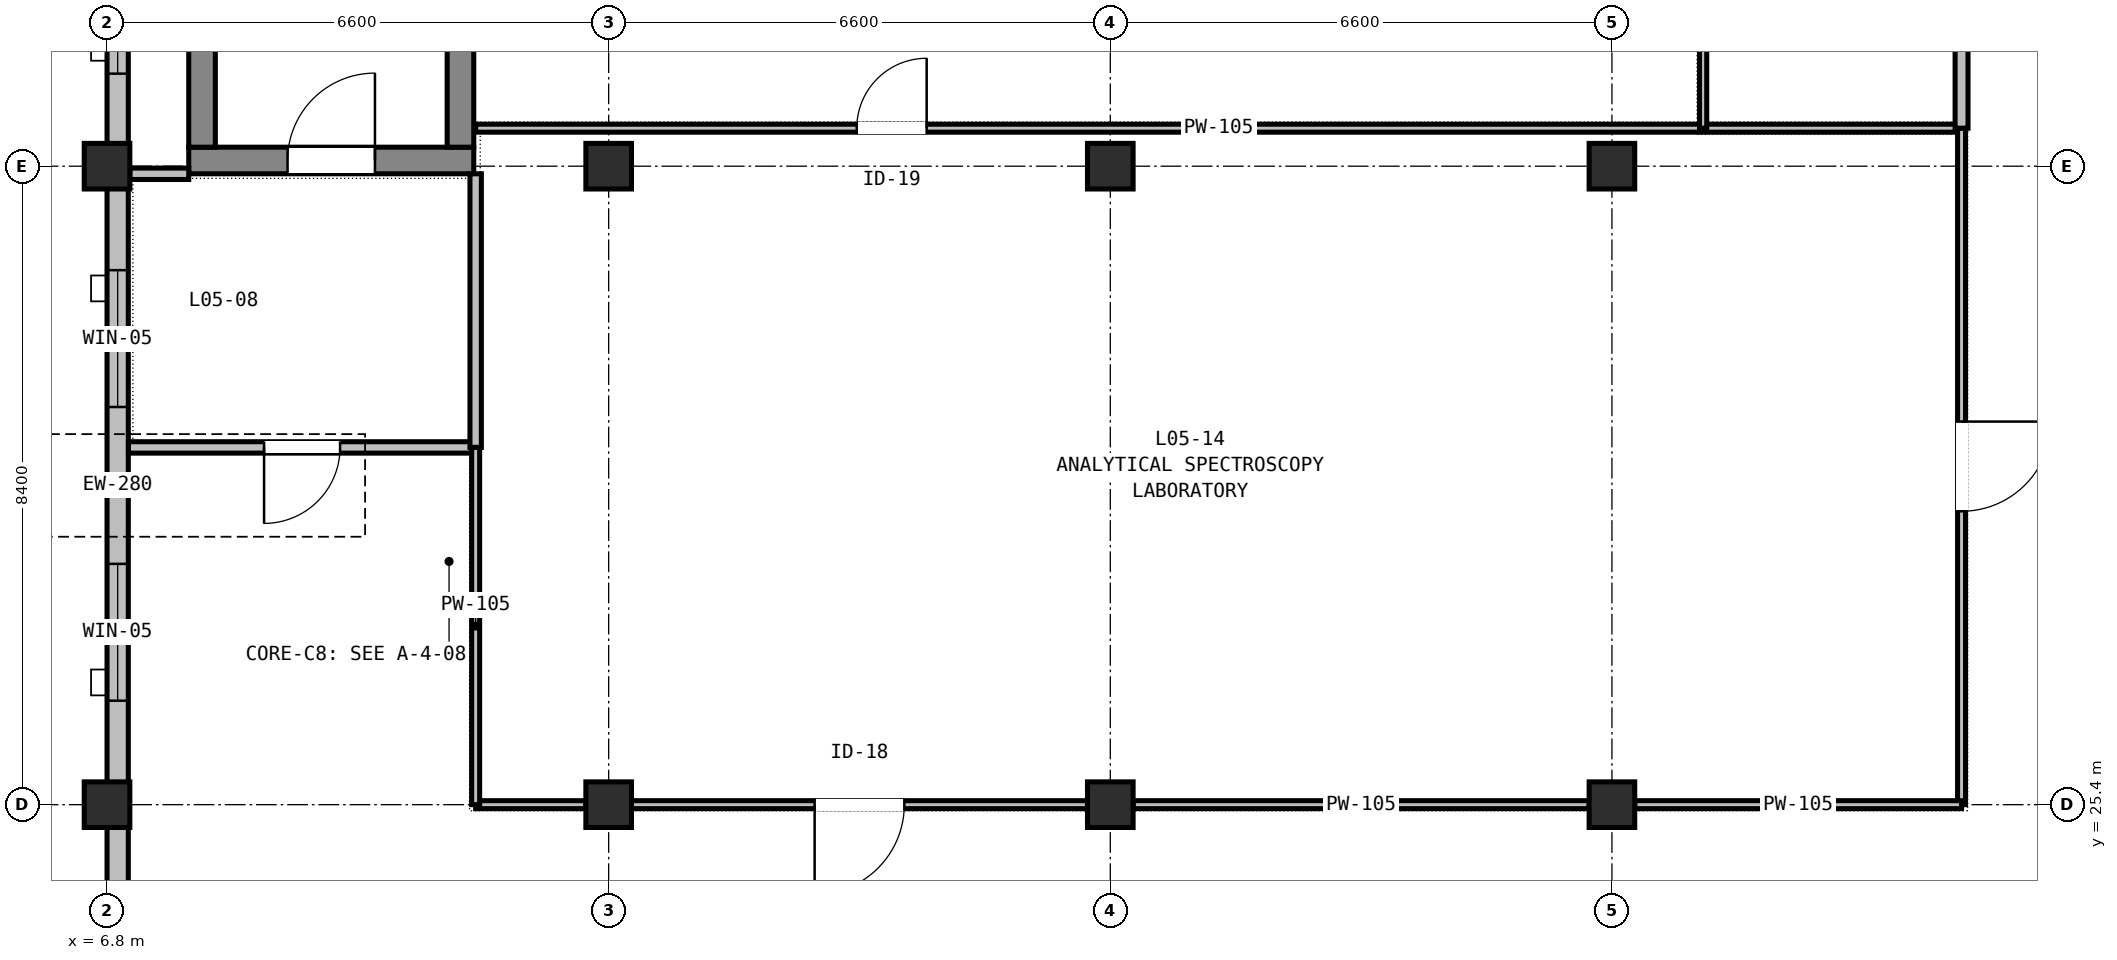
"""IFC4 building model, lengths in metres.
Left out: names, types, materials, properties, quantities, classifications, styles, units other than length and angle.
Written with IfcOpenShell. Run it as: python <this file> out.ifc"""

import sys

from ifc_helpers import new_model, si_unit, direction, frame, frame_2d, origin, origin_2d, place, context, subcontext, project, spatial, rectangle, extrude, element, fill, save


model = new_model("IFC4")
c1 = context("Model", 3, precision=1e-05, world=origin(), true_north=direction((0.0, 1.0)))
c2 = subcontext(c1, "Body", "Model", "MODEL_VIEW")
j1 = project(units=[si_unit("LENGTHUNIT", "METRE"), si_unit("PLANEANGLEUNIT", "RADIAN")], contexts=[c1])
p1 = place(None, origin())
s1 = spatial("IfcSite", under=j1, at=p1, CompositionType="ELEMENT")
p2 = place(p1, origin())
s2 = spatial("IfcBuilding", under=s1, at=p2, CompositionType="ELEMENT")
p3 = place(p2, frame((0.0, 0.0, 24.0)))
s3 = spatial("IfcBuildingStorey", under=s2, at=p3, CompositionType="ELEMENT", Elevation=24.0)
for number, where, z_axis, x_axis in (
    (1, (6.8, 25.4, 0.0), (0.0, 0.0, 1.0), (1.0, 0.0, 0.0)),
    (2, (6.8, 33.8, 0.0), (0.0, 0.0, 1.0), (1.0, 0.0, 0.0)),
    (3, (13.4, 25.4, 0.0), (0.0, 0.0, 1.0), (1.0, 0.0, 0.0)),
    (4, (13.4, 33.8, 0.0), (0.0, 0.0, 1.0), (1.0, 0.0, 0.0)),
    (5, (20.0, 25.4, 0.0), (0.0, 0.0, 1.0), (1.0, 0.0, 0.0)),
    (6, (20.0, 33.8, 0.0), (0.0, 0.0, 1.0), (1.0, 0.0, 0.0)),
    (7, (26.6, 25.4, 0.0), (0.0, 0.0, 1.0), (1.0, 0.0, 0.0)),
    (8, (26.6, 33.8, 0.0), (0.0, 0.0, 1.0), (1.0, 0.0, 0.0)),
):
    element("IfcColumn", number, at=place(p3, frame(where, z_axis=z_axis, x_axis=x_axis)), inside=s3, PredefinedType="COLUMN", context=c2, shape_type="SweptSolid", body=[
        extrude(rectangle(XDim=0.6, YDim=0.6, at=origin_2d()), origin(), (0.0, 0.0, 1.0), 4.44),
    ])
p4 = place(p3, frame((7.875, 33.875, 0.0), z_axis=(0.0, 0.0, 1.0), x_axis=(1.0, 0.0, 0.0)))
e9 = element("IfcWall", 9, at=p4, inside=s3, PredefinedType="SHEAR", context=c2, shape_type="SweptSolid", body=[
    extrude(rectangle(XDim=3.75, YDim=0.35, at=frame_2d((1.875, 0.0))), origin(), (0.0, 0.0, 1.0), 4.44),
])
p5 = place(p4, frame((1.3, 0.0, 0.0)))
e10 = element("IfcOpeningElement", 10, at=p5, cuts=e9, PredefinedType="OPENING", context=c2, shape_type="SweptSolid", body=[
    extrude(rectangle(XDim=1.15, YDim=2.15, at=frame_2d((0.575, 1.075))), frame((0.0, 0.185, 0.0), z_axis=(0.0, -1.0, 0.0), x_axis=(1.0, 0.0, 0.0)), (0.0, 0.0, 1.0), 0.37),
])
for number, where, z_axis, x_axis in (
    (11, (8.05, 34.05, 0.0), (0.0, 0.0, 1.0), (0.0, 1.0, 0.0)),
    (12, (11.45, 34.05, 0.0), (0.0, 0.0, 1.0), (0.0, 1.0, 0.0)),
):
    element("IfcWall", number, at=place(p3, frame(where, z_axis=z_axis, x_axis=x_axis)), inside=s3, PredefinedType="SHEAR", context=c2, shape_type="SweptSolid", body=[
        extrude(rectangle(XDim=7.275, YDim=0.35, at=frame_2d((3.637, 0.0))), origin(), (0.0, 0.0, 1.0), 4.44),
    ])
p6 = place(p3, frame((6.94, 17.28, 0.0), z_axis=(0.0, 0.0, 1.0), x_axis=(0.0, 1.0, 0.0)))
e13 = element("IfcWall", 13, at=p6, inside=s3, PredefinedType="STANDARD", context=c2, shape_type="SweptSolid", body=[
    extrude(rectangle(XDim=8.12, YDim=0.28, at=frame_2d((4.06, 0.0))), origin(), (0.0, 0.0, 1.0), 3.885),
])
p7 = place(p6, frame((1.367, 0.0, 0.9)))
e14 = element("IfcOpeningElement", 14, at=p7, cuts=e13, PredefinedType="OPENING", context=c2, shape_type="SweptSolid", body=[
    extrude(rectangle(XDim=1.65, YDim=2.1, at=frame_2d((0.825, 1.05))), frame((0.0, 0.15, 0.0), z_axis=(0.0, -1.0, 0.0), x_axis=(1.0, 0.0, 0.0)), (0.0, 0.0, 1.0), 0.3),
])
p8 = place(p6, frame((3.83, 0.0, 0.9)))
e15 = element("IfcOpeningElement", 15, at=p8, cuts=e13, PredefinedType="OPENING", context=c2, shape_type="SweptSolid", body=[
    extrude(rectangle(XDim=1.65, YDim=2.1, at=frame_2d((0.825, 1.05))), frame((0.0, 0.15, 0.0), z_axis=(0.0, -1.0, 0.0), x_axis=(1.0, 0.0, 0.0)), (0.0, 0.0, 1.0), 0.3),
])
p9 = place(p3, frame((6.94, 25.4, 0.0), z_axis=(0.0, 0.0, 1.0), x_axis=(0.0, 1.0, 0.0)))
e16 = element("IfcWall", 16, at=p9, inside=s3, PredefinedType="STANDARD", context=c2, shape_type="SweptSolid", body=[
    extrude(rectangle(XDim=8.4, YDim=0.28, at=frame_2d((4.2, 0.0))), origin(), (0.0, 0.0, 1.0), 3.885),
])
p10 = place(p9, frame((1.368, 0.0, 0.9)))
e17 = element("IfcOpeningElement", 17, at=p10, cuts=e16, PredefinedType="OPENING", context=c2, shape_type="SweptSolid", body=[
    extrude(rectangle(XDim=1.8, YDim=2.1, at=frame_2d((0.9, 1.05))), frame((0.0, 0.15, 0.0), z_axis=(0.0, -1.0, 0.0), x_axis=(1.0, 0.0, 0.0)), (0.0, 0.0, 1.0), 0.3),
])
p11 = place(p9, frame((5.232, 0.0, 0.9)))
e18 = element("IfcOpeningElement", 18, at=p11, cuts=e16, PredefinedType="OPENING", context=c2, shape_type="SweptSolid", body=[
    extrude(rectangle(XDim=1.8, YDim=2.1, at=frame_2d((0.9, 1.05))), frame((0.0, 0.15, 0.0), z_axis=(0.0, -1.0, 0.0), x_axis=(1.0, 0.0, 0.0)), (0.0, 0.0, 1.0), 0.3),
])
p12 = place(p3, frame((6.94, 33.8, 0.0), z_axis=(0.0, 0.0, 1.0), x_axis=(0.0, 1.0, 0.0)))
e19 = element("IfcWall", 19, at=p12, inside=s3, PredefinedType="STANDARD", context=c2, shape_type="SweptSolid", body=[
    extrude(rectangle(XDim=8.12, YDim=0.28, at=frame_2d((4.06, 0.0))), origin(), (0.0, 0.0, 1.0), 3.885),
])
p13 = place(p12, frame((1.217, 0.0, 0.9)))
e20 = element("IfcOpeningElement", 20, at=p13, cuts=e19, PredefinedType="OPENING", context=c2, shape_type="SweptSolid", body=[
    extrude(rectangle(XDim=1.95, YDim=2.1, at=frame_2d((0.975, 1.05))), frame((0.0, 0.15, 0.0), z_axis=(0.0, -1.0, 0.0), x_axis=(1.0, 0.0, 0.0)), (0.0, 0.0, 1.0), 0.3),
])
p14 = place(p12, frame((4.953, 0.0, 0.9)))
e21 = element("IfcOpeningElement", 21, at=p14, cuts=e19, PredefinedType="OPENING", context=c2, shape_type="SweptSolid", body=[
    extrude(rectangle(XDim=1.95, YDim=2.1, at=frame_2d((0.975, 1.05))), frame((0.0, 0.15, 0.0), z_axis=(0.0, -1.0, 0.0), x_axis=(1.0, 0.0, 0.0)), (0.0, 0.0, 1.0), 0.3),
])
p15 = place(p3, frame((11.65, 30.1, 0.0), z_axis=(0.0, 0.0, 1.0), x_axis=(-1.0, 0.0, 0.0)))
e22 = element("IfcWall", 22, at=p15, inside=s3, PredefinedType="PARTITIONING", context=c2, shape_type="SweptSolid", body=[
    extrude(rectangle(XDim=4.568, YDim=0.15, at=frame_2d((2.284, 0.0))), origin(), (0.0, 0.0, 1.0), 3.985),
])
p16 = place(p15, frame((1.784, 0.0, 0.0)))
e23 = element("IfcOpeningElement", 23, at=p16, cuts=e22, PredefinedType="OPENING", context=c2, shape_type="SweptSolid", body=[
    extrude(rectangle(XDim=1.0, YDim=2.1, at=frame_2d((0.5, 1.05))), frame((0.0, 0.085, 0.0), z_axis=(0.0, -1.0, 0.0), x_axis=(1.0, 0.0, 0.0)), (0.0, 0.0, 1.0), 0.17),
])
p17 = place(p3, frame((7.1, 33.7, 0.0), z_axis=(0.0, 0.0, 1.0), x_axis=(1.0, 0.0, 0.0)))
e24 = element("IfcWall", 24, at=p17, inside=s3, PredefinedType="PARTITIONING", context=c2, shape_type="SweptSolid", body=[
    extrude(rectangle(XDim=0.775, YDim=0.15, at=frame_2d((0.387, 0.0))), origin(), (0.0, 0.0, 1.0), 3.885),
])
p18 = place(p3, frame((11.65, 33.7, 0.0), z_axis=(0.0, 0.0, 1.0), x_axis=(0.0, -1.0, 0.0)))
e25 = element("IfcWall", 25, at=p18, inside=s3, PredefinedType="PARTITIONING", context=c2, shape_type="SweptSolid", body=[
    extrude(rectangle(XDim=3.6, YDim=0.15, at=frame_2d((1.8, 0.0))), origin(), (0.0, 0.0, 1.0), 3.885),
])
p19 = place(p3, frame((11.65, 34.3, 0.0), z_axis=(0.0, 0.0, 1.0), x_axis=(1.0, 0.0, 0.0)))
e26 = element("IfcWall", 26, at=p19, inside=s3, PredefinedType="PARTITIONING", context=c2, shape_type="SweptSolid", body=[
    extrude(rectangle(XDim=19.55, YDim=0.105, at=frame_2d((9.775, 0.0))), origin(), (0.0, 0.0, 1.0), 3.735),
])
p20 = place(p19, frame((5.014, 0.0, 0.0)))
e27 = element("IfcOpeningElement", 27, at=p20, cuts=e26, PredefinedType="OPENING", context=c2, shape_type="SweptSolid", body=[
    extrude(rectangle(XDim=0.92, YDim=2.14, at=frame_2d((0.46, 1.07))), frame((0.0, 0.062, 0.0), z_axis=(0.0, -1.0, 0.0), x_axis=(1.0, 0.0, 0.0)), (0.0, 0.0, 1.0), 0.125),
])
p21 = place(p3, frame((31.2, 34.3, 0.0), z_axis=(0.0, 0.0, 1.0), x_axis=(0.0, -1.0, 0.0)))
e28 = element("IfcWall", 28, at=p21, inside=s3, PredefinedType="PARTITIONING", context=c2, shape_type="SweptSolid", body=[
    extrude(rectangle(XDim=8.9, YDim=0.105, at=frame_2d((4.45, 0.0))), origin(), (0.0, 0.0, 1.0), 3.885),
])
p22 = place(p21, frame((3.86, 0.0, 0.0)))
e29 = element("IfcOpeningElement", 29, at=p22, cuts=e28, PredefinedType="OPENING", context=c2, shape_type="SweptSolid", body=[
    extrude(rectangle(XDim=1.18, YDim=2.1, at=frame_2d((0.59, 1.05))), frame((0.0, 0.062, 0.0), z_axis=(0.0, -1.0, 0.0), x_axis=(1.0, 0.0, 0.0)), (0.0, 0.0, 1.0), 0.125),
])
p23 = place(p3, frame((31.2, 25.4, 0.0), z_axis=(0.0, 0.0, 1.0), x_axis=(-1.0, 0.0, 0.0)))
e30 = element("IfcWall", 30, at=p23, inside=s3, PredefinedType="PARTITIONING", context=c2, shape_type="SweptSolid", body=[
    extrude(rectangle(XDim=4.3, YDim=0.105, at=frame_2d((2.15, 0.0))), origin(), (0.0, 0.0, 1.0), 3.885),
])
p24 = place(p3, frame((26.3, 25.4, 0.0), z_axis=(0.0, 0.0, 1.0), x_axis=(-1.0, 0.0, 0.0)))
e31 = element("IfcWall", 31, at=p24, inside=s3, PredefinedType="PARTITIONING", context=c2, shape_type="SweptSolid", body=[
    extrude(rectangle(XDim=6.0, YDim=0.105, at=frame_2d((3.0, 0.0))), origin(), (0.0, 0.0, 1.0), 3.885),
])
p25 = place(p3, frame((19.7, 25.4, 0.0), z_axis=(0.0, 0.0, 1.0), x_axis=(-1.0, 0.0, 0.0)))
e32 = element("IfcWall", 32, at=p25, inside=s3, PredefinedType="PARTITIONING", context=c2, shape_type="SweptSolid", body=[
    extrude(rectangle(XDim=6.0, YDim=0.105, at=frame_2d((3.0, 0.0))), origin(), (0.0, 0.0, 1.0), 3.885),
])
p26 = place(p25, frame((2.41, 0.0, 0.0)))
e33 = element("IfcOpeningElement", 33, at=p26, cuts=e32, PredefinedType="OPENING", context=c2, shape_type="SweptSolid", body=[
    extrude(rectangle(XDim=1.18, YDim=2.1, at=frame_2d((0.59, 1.05))), frame((0.0, 0.062, 0.0), z_axis=(0.0, -1.0, 0.0), x_axis=(1.0, 0.0, 0.0)), (0.0, 0.0, 1.0), 0.125),
])
p27 = place(p3, frame((13.1, 25.4, 0.0), z_axis=(0.0, 0.0, 1.0), x_axis=(-1.0, 0.0, 0.0)))
e34 = element("IfcWall", 34, at=p27, inside=s3, PredefinedType="PARTITIONING", context=c2, shape_type="SweptSolid", body=[
    extrude(rectangle(XDim=1.45, YDim=0.105, at=frame_2d((0.725, 0.0))), origin(), (0.0, 0.0, 1.0), 3.885),
])
p28 = place(p3, frame((11.65, 25.4, 0.0), z_axis=(0.0, 0.0, 1.0), x_axis=(0.0, 1.0, 0.0)))
e35 = element("IfcWall", 35, at=p28, inside=s3, PredefinedType="PARTITIONING", context=c2, shape_type="SweptSolid", body=[
    extrude(rectangle(XDim=4.7, YDim=0.105, at=frame_2d((2.35, 0.0))), origin(), (0.0, 0.0, 1.0), 3.885),
])
p29 = place(p3, frame((27.8, 41.918, 0.0), z_axis=(0.0, 0.0, 1.0), x_axis=(0.0, -1.0, 0.0)))
e36 = element("IfcWall", 36, at=p29, inside=s3, PredefinedType="PARTITIONING", context=c2, shape_type="SweptSolid", body=[
    extrude(rectangle(XDim=7.618, YDim=0.095, at=frame_2d((3.809, 0.0))), origin(), (0.0, 0.0, 1.0), 4.215),
])
p30 = place(p29, frame((3.349, 0.0, 0.0)))
e37 = element("IfcOpeningElement", 37, at=p30, cuts=e36, PredefinedType="OPENING", context=c2, shape_type="SweptSolid", body=[
    extrude(rectangle(XDim=0.92, YDim=2.14, at=frame_2d((0.46, 1.07))), frame((0.0, 0.057, 0.0), z_axis=(0.0, -1.0, 0.0), x_axis=(1.0, 0.0, 0.0)), (0.0, 0.0, 1.0), 0.115),
])
p31 = place(p3, frame((31.2, 41.918, 0.0), z_axis=(0.0, 0.0, 1.0), x_axis=(0.0, -1.0, 0.0)))
e38 = element("IfcWall", 38, at=p31, inside=s3, PredefinedType="PARTITIONING", context=c2, shape_type="SweptSolid", body=[
    extrude(rectangle(XDim=7.618, YDim=0.17, at=frame_2d((3.809, 0.0))), origin(), (0.0, 0.0, 1.0), 4.215),
])
p32 = place(p31, frame((3.039, 0.0, 0.0)))
e39 = element("IfcOpeningElement", 39, at=p32, cuts=e38, PredefinedType="OPENING", context=c2, shape_type="SweptSolid", body=[
    extrude(rectangle(XDim=1.54, YDim=2.2, at=frame_2d((0.77, 1.1))), frame((0.0, 0.095, 0.0), z_axis=(0.0, -1.0, 0.0), x_axis=(1.0, 0.0, 0.0)), (0.0, 0.0, 1.0), 0.19),
])
p33 = place(p10, origin())
e40 = element("IfcWindow", 40, at=p33, inside=s3, PartitioningType="SINGLE_PANEL", PredefinedType="WINDOW", context=c2, shape_type="SweptSolid", body=[
    extrude(rectangle(XDim=1.8, YDim=2.1, at=frame_2d((0.9, 1.05))), frame((0.0, 0.03, 0.0), z_axis=(0.0, -1.0, 0.0), x_axis=(1.0, 0.0, 0.0)), (0.0, 0.0, 1.0), 0.06),
])
fill(e17, e40)
p34 = place(p11, origin())
e41 = element("IfcWindow", 41, at=p34, inside=s3, PartitioningType="SINGLE_PANEL", PredefinedType="WINDOW", context=c2, shape_type="SweptSolid", body=[
    extrude(rectangle(XDim=1.8, YDim=2.1, at=frame_2d((0.9, 1.05))), frame((0.0, 0.03, 0.0), z_axis=(0.0, -1.0, 0.0), x_axis=(1.0, 0.0, 0.0)), (0.0, 0.0, 1.0), 0.06),
])
fill(e18, e41)
p35 = place(p13, origin())
e42 = element("IfcWindow", 42, at=p35, inside=s3, PartitioningType="SINGLE_PANEL", PredefinedType="WINDOW", context=c2, shape_type="SweptSolid", body=[
    extrude(rectangle(XDim=1.95, YDim=2.1, at=frame_2d((0.975, 1.05))), frame((0.0, 0.03, 0.0), z_axis=(0.0, -1.0, 0.0), x_axis=(1.0, 0.0, 0.0)), (0.0, 0.0, 1.0), 0.06),
])
fill(e20, e42)
p36 = place(p5, origin())
e43 = element("IfcDoor", 43, at=p36, inside=s3, OperationType="SINGLE_SWING_RIGHT", PredefinedType="DOOR", context=c2, shape_type="SweptSolid", body=[
    extrude(rectangle(XDim=1.15, YDim=2.15, at=frame_2d((0.575, 1.075))), frame((0.0, 0.025, 0.0), z_axis=(0.0, -1.0, 0.0), x_axis=(1.0, 0.0, 0.0)), (0.0, 0.0, 1.0), 0.05),
])
fill(e10, e43)
p37 = place(p16, origin())
e44 = element("IfcDoor", 44, at=p37, inside=s3, OperationType="SINGLE_SWING_RIGHT", PredefinedType="DOOR", context=c2, shape_type="SweptSolid", body=[
    extrude(rectangle(XDim=1.0, YDim=2.1, at=frame_2d((0.5, 1.05))), frame((0.0, 0.025, 0.0), z_axis=(0.0, -1.0, 0.0), x_axis=(1.0, 0.0, 0.0)), (0.0, 0.0, 1.0), 0.05),
])
fill(e23, e44)
p38 = place(p22, origin())
e45 = element("IfcDoor", 45, at=p38, inside=s3, OperationType="SINGLE_SWING_LEFT", PredefinedType="DOOR", context=c2, shape_type="SweptSolid", body=[
    extrude(rectangle(XDim=1.18, YDim=2.1, at=frame_2d((0.59, 1.05))), frame((0.0, 0.025, 0.0), z_axis=(0.0, -1.0, 0.0), x_axis=(1.0, 0.0, 0.0)), (0.0, 0.0, 1.0), 0.05),
])
fill(e29, e45)
p39 = place(p26, origin())
e46 = element("IfcDoor", 46, at=p39, inside=s3, OperationType="SINGLE_SWING_RIGHT", PredefinedType="DOOR", context=c2, shape_type="SweptSolid", body=[
    extrude(rectangle(XDim=1.18, YDim=2.1, at=frame_2d((0.59, 1.05))), frame((0.0, 0.025, 0.0), z_axis=(0.0, -1.0, 0.0), x_axis=(1.0, 0.0, 0.0)), (0.0, 0.0, 1.0), 0.05),
])
fill(e33, e46)
p40 = place(p20, origin())
e47 = element("IfcDoor", 47, at=p40, inside=s3, OperationType="SINGLE_SWING_RIGHT", PredefinedType="DOOR", context=c2, shape_type="SweptSolid", body=[
    extrude(rectangle(XDim=0.92, YDim=2.14, at=frame_2d((0.46, 1.07))), frame((0.0, 0.025, 0.0), z_axis=(0.0, -1.0, 0.0), x_axis=(1.0, 0.0, 0.0)), (0.0, 0.0, 1.0), 0.05),
])
fill(e27, e47)
save(model, sys.argv[1])
